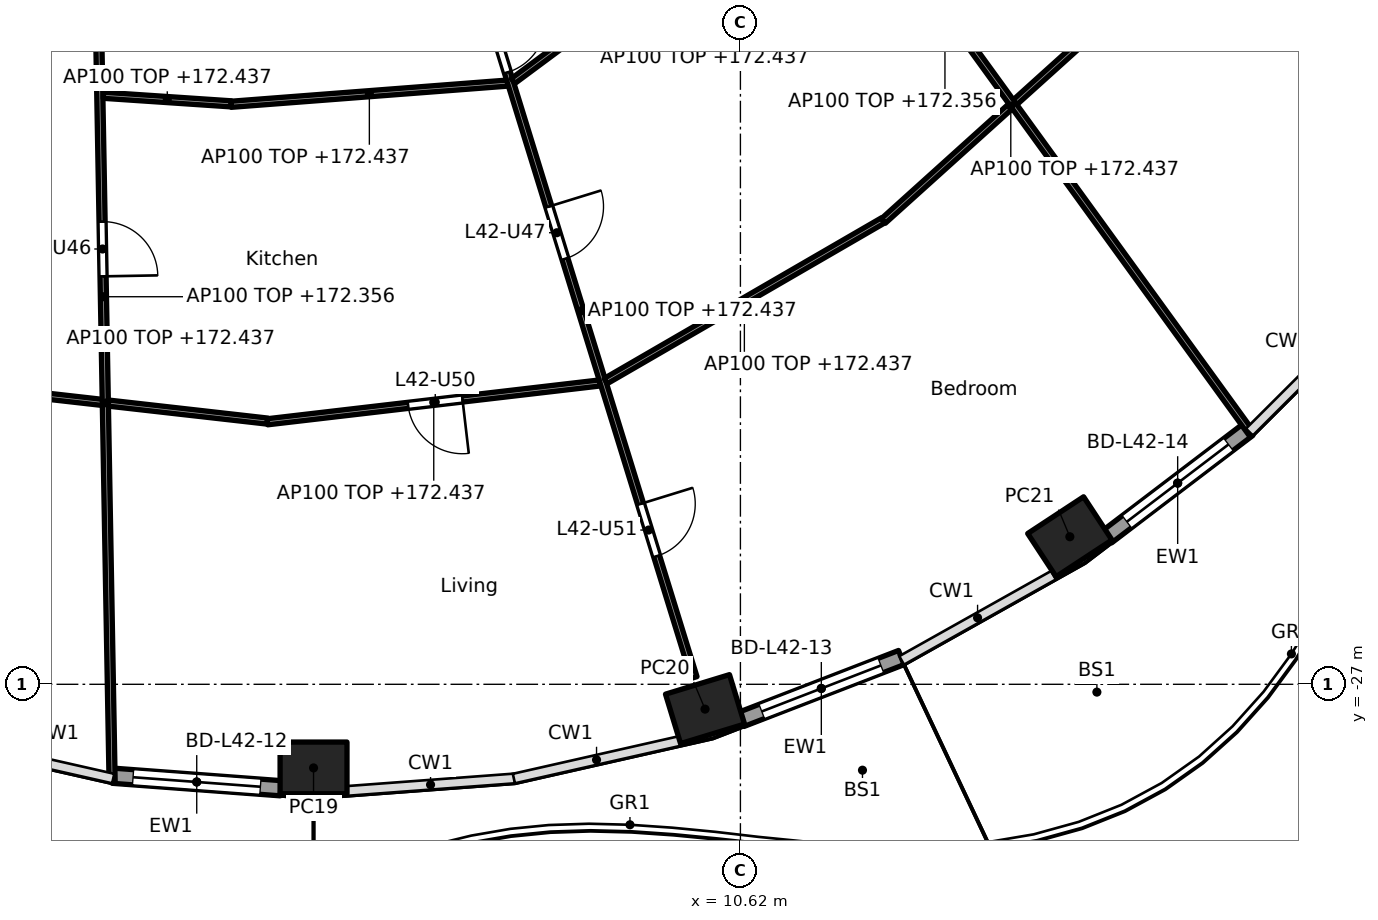
"""IFC4 building model, lengths in metres.
Left out: names, types, materials, properties, quantities, classifications, styles, units other than length and angle.
Written with IfcOpenShell. Run it as: python <this file> out.ifc"""

import sys

from ifc_helpers import new_model, si_unit, direction, frame, frame_2d, origin, origin_2d, place, context, subcontext, project, spatial, rectangle, hollow_rectangle, extrude, element, fill, save


model = new_model("IFC4")
c1 = context("Model", 3, precision=1e-05, world=origin(), true_north=direction((0.0, 1.0)))
c2 = subcontext(c1, "Body", "Model", "MODEL_VIEW")
j1 = project(units=[si_unit("LENGTHUNIT", "METRE"), si_unit("PLANEANGLEUNIT", "RADIAN")], contexts=[c1])
p1 = place(None, origin())
s1 = spatial("IfcSite", under=j1, at=p1, CompositionType="ELEMENT")
p2 = place(p1, origin())
s2 = spatial("IfcBuilding", under=s1, at=p2, CompositionType="ELEMENT")
p3 = place(p2, frame((0.0, 0.0, 169.6)))
s3 = spatial("IfcBuildingStorey", under=s2, at=p3, CompositionType="ELEMENT", Elevation=169.6)
for number, where, z_axis, x_axis in (
    (1, (3.6, -28.375, 0.0), (0.0, 0.0, 1.0), (1.0, 0.0, 0.0)),
    (2, (10.038, -27.408, 0.0), (0.0, 0.0, 1.0), (0.957, 0.292, 0.0)),
    (3, (16.038, -24.573, 0.0), (0.0, 0.0, 1.0), (0.836, 0.549, 0.0)),
):
    element("IfcColumn", number, at=place(p3, frame(where, z_axis=z_axis, x_axis=x_axis)), inside=s3, PredefinedType="COLUMN", context=c2, shape_type="SweptSolid", body=[
        extrude(hollow_rectangle(XDim=1.1, YDim=0.85, WallThickness=0.036, at=origin_2d()), origin(), (0.0, 0.0, 1.0), 3.7),
    ])
p4 = place(p3, frame((3.061, -28.709, 0.0), z_axis=(0.0, 0.0, 1.0), x_axis=(-0.997232064422, 0.074351931305, 0.0)))
e4 = element("IfcWall", 4, at=p4, inside=s3, PredefinedType="SOLIDWALL", context=c2, shape_type="SweptSolid", body=[
    extrude(rectangle(XDim=2.771, YDim=0.25, at=frame_2d((1.386, 0.0))), origin(), (0.0, 0.0, 1.0), 3.44),
])
p5 = place(p4, frame((0.336, 0.0, 0.0)))
e5 = element("IfcOpeningElement", 5, at=p5, cuts=e4, PredefinedType="OPENING", context=c2, shape_type="SweptSolid", body=[
    extrude(rectangle(XDim=2.1, YDim=2.4, at=frame_2d((1.05, 1.2))), frame((0.0, 0.135, 0.0), z_axis=(0.0, -1.0, 0.0), x_axis=(1.0, 0.0, 0.0)), (0.0, 0.0, 1.0), 0.27),
])
p6 = place(p3, frame((13.266, -26.56, 0.0), z_axis=(0.0, 0.0, 1.0), x_axis=(-0.932806734513, -0.360377019311, 0.0)))
e6 = element("IfcWall", 6, at=p6, inside=s3, PredefinedType="SOLIDWALL", context=c2, shape_type="SweptSolid", body=[
    extrude(rectangle(XDim=2.82, YDim=0.25, at=frame_2d((1.41, 0.0))), origin(), (0.0, 0.0, 1.0), 3.44),
])
p7 = place(p6, frame((0.36, 0.0, 0.0)))
e7 = element("IfcOpeningElement", 7, at=p7, cuts=e6, PredefinedType="OPENING", context=c2, shape_type="SweptSolid", body=[
    extrude(rectangle(XDim=2.1, YDim=2.4, at=frame_2d((1.05, 1.2))), frame((0.0, 0.135, 0.0), z_axis=(0.0, -1.0, 0.0), x_axis=(1.0, 0.0, 0.0)), (0.0, 0.0, 1.0), 0.27),
])
p8 = place(p3, frame((18.972, -22.809, 0.0), z_axis=(0.0, 0.0, 1.0), x_axis=(-0.796055733703, -0.60522332146, 0.0)))
e8 = element("IfcWall", 8, at=p8, inside=s3, PredefinedType="SOLIDWALL", context=c2, shape_type="SweptSolid", body=[
    extrude(rectangle(XDim=2.917, YDim=0.25, at=frame_2d((1.458, 0.0))), origin(), (0.0, 0.0, 1.0), 3.44),
])
p9 = place(p8, frame((0.408, 0.0, 0.0)))
e9 = element("IfcOpeningElement", 9, at=p9, cuts=e8, PredefinedType="OPENING", context=c2, shape_type="SweptSolid", body=[
    extrude(rectangle(XDim=2.1, YDim=2.4, at=frame_2d((1.05, 1.2))), frame((0.0, 0.135, 0.0), z_axis=(0.0, -1.0, 0.0), x_axis=(1.0, 0.0, 0.0)), (0.0, 0.0, 1.0), 0.27),
])
p10 = place(p3, frame((-2.449, -22.073, 0.0), z_axis=(0.0, 0.0, 1.0), x_axis=(0.993660315081, -0.112424099879, 0.0)))
e10 = element("IfcWall", 10, at=p10, inside=s3, PredefinedType="PARTITIONING", context=c2, shape_type="SweptSolid", body=[
    extrude(rectangle(XDim=5.325, YDim=0.1, at=frame_2d((2.662, 0.0))), origin(), (0.0, 0.0, 1.0), 2.837),
])
p11 = place(p3, frame((0.002, -12.665, 0.0), z_axis=(0.0, 0.0, 1.0), x_axis=(0.01792079652, -0.999839409631, 0.0)))
e11 = element("IfcWall", 11, at=p11, inside=s3, PredefinedType="PARTITIONING", context=c2, shape_type="SweptSolid", body=[
    extrude(rectangle(XDim=15.926, YDim=0.1, at=frame_2d((7.963, 0.0))), origin(), (0.0, 0.0, 1.0), 2.756),
])
p12 = place(p11, frame((1.873, 0.0, 0.0)))
e12 = element("IfcOpeningElement", 12, at=p12, cuts=e11, PredefinedType="OPENING", context=c2, shape_type="SweptSolid", body=[
    extrude(rectangle(XDim=0.9, YDim=2.1, at=frame_2d((0.45, 1.05))), frame((0.0, 0.06, 0.0), z_axis=(0.0, -1.0, 0.0), x_axis=(1.0, 0.0, 0.0)), (0.0, 0.0, 1.0), 0.12),
])
p13 = place(p11, frame((6.728, 0.0, 0.0)))
e13 = element("IfcOpeningElement", 13, at=p13, cuts=e11, PredefinedType="OPENING", context=c2, shape_type="SweptSolid", body=[
    extrude(rectangle(XDim=0.9, YDim=2.1, at=frame_2d((0.45, 1.05))), frame((0.0, 0.06, 0.0), z_axis=(0.0, -1.0, 0.0), x_axis=(1.0, 0.0, 0.0)), (0.0, 0.0, 1.0), 0.12),
])
p14 = place(p3, frame((0.145, -17.314, 0.0), z_axis=(0.0, 0.0, 1.0), x_axis=(0.997756833447, -0.06694252243, 0.0)))
e14 = element("IfcWall", 14, at=p14, inside=s3, PredefinedType="PARTITIONING", context=c2, shape_type="SweptSolid", body=[
    extrude(rectangle(XDim=2.104, YDim=0.1, at=frame_2d((1.052, 0.0))), origin(), (0.0, 0.0, 1.0), 2.837),
])
p15 = place(p3, frame((2.245, -17.462, 0.0), z_axis=(0.0, 0.0, 1.0), x_axis=(0.997077117727, 0.07640171009, 0.0)))
e15 = element("IfcWall", 15, at=p15, inside=s3, PredefinedType="PARTITIONING", context=c2, shape_type="SweptSolid", body=[
    extrude(rectangle(XDim=4.56, YDim=0.1, at=frame_2d((2.28, 0.0))), origin(), (0.0, 0.0, 1.0), 2.837),
])
p16 = place(p3, frame((2.842, -22.683, 0.0), z_axis=(0.0, 0.0, 1.0), x_axis=(0.993248590259, 0.116005335864, 0.0)))
e16 = element("IfcWall", 16, at=p16, inside=s3, PredefinedType="PARTITIONING", context=c2, shape_type="SweptSolid", body=[
    extrude(rectangle(XDim=5.508, YDim=0.1, at=frame_2d((2.754, 0.0))), origin(), (0.0, 0.0, 1.0), 2.837),
])
p17 = place(p16, frame((2.329, 0.0, 0.0)))
e17 = element("IfcOpeningElement", 17, at=p17, cuts=e16, PredefinedType="OPENING", context=c2, shape_type="SweptSolid", body=[
    extrude(rectangle(XDim=0.9, YDim=2.1, at=frame_2d((0.45, 1.05))), frame((0.0, 0.06, 0.0), z_axis=(0.0, -1.0, 0.0), x_axis=(1.0, 0.0, 0.0)), (0.0, 0.0, 1.0), 0.12),
])
p18 = place(p3, frame((6.138, -14.83, 0.0), z_axis=(0.0, 0.0, 1.0), x_axis=(0.294818517221, -0.955553264818, 0.0)))
e18 = element("IfcWall", 18, at=p18, inside=s3, PredefinedType="PARTITIONING", context=c2, shape_type="SweptSolid", body=[
    extrude(rectangle(XDim=12.619, YDim=0.1, at=frame_2d((6.31, 0.0))), origin(), (0.0, 0.0, 1.0), 2.837),
])
p19 = place(p18, frame((1.306, 0.0, 0.0)))
e19 = element("IfcOpeningElement", 19, at=p19, cuts=e18, PredefinedType="OPENING", context=c2, shape_type="SweptSolid", body=[
    extrude(rectangle(XDim=0.9, YDim=2.1, at=frame_2d((0.45, 1.05))), frame((0.0, 0.06, 0.0), z_axis=(0.0, -1.0, 0.0), x_axis=(1.0, 0.0, 0.0)), (0.0, 0.0, 1.0), 0.12),
])
p20 = place(p18, frame((4.515, 0.0, 0.0)))
e20 = element("IfcOpeningElement", 20, at=p20, cuts=e18, PredefinedType="OPENING", context=c2, shape_type="SweptSolid", body=[
    extrude(rectangle(XDim=0.9, YDim=2.1, at=frame_2d((0.45, 1.05))), frame((0.0, 0.06, 0.0), z_axis=(0.0, -1.0, 0.0), x_axis=(1.0, 0.0, 0.0)), (0.0, 0.0, 1.0), 0.12),
])
p21 = place(p18, frame((9.632, 0.0, 0.0)))
e21 = element("IfcOpeningElement", 21, at=p21, cuts=e18, PredefinedType="OPENING", context=c2, shape_type="SweptSolid", body=[
    extrude(rectangle(XDim=0.9, YDim=2.1, at=frame_2d((0.45, 1.05))), frame((0.0, 0.06, 0.0), z_axis=(0.0, -1.0, 0.0), x_axis=(1.0, 0.0, 0.0)), (0.0, 0.0, 1.0), 0.12),
])
p22 = place(p3, frame((6.881, -17.08, 0.0), z_axis=(0.0, 0.0, 1.0), x_axis=(0.802784956441, 0.596268659005, 0.0)))
e22 = element("IfcWall", 22, at=p22, inside=s3, PredefinedType="PARTITIONING", context=c2, shape_type="SweptSolid", body=[
    extrude(rectangle(XDim=4.142, YDim=0.1, at=frame_2d((2.071, 0.0))), origin(), (0.0, 0.0, 1.0), 2.837),
])
p23 = place(p3, frame((8.405, -22.013, 0.0), z_axis=(0.0, 0.0, 1.0), x_axis=(0.865277177388, 0.501293732547, 0.0)))
e23 = element("IfcWall", 23, at=p23, inside=s3, PredefinedType="PARTITIONING", context=c2, shape_type="SweptSolid", body=[
    extrude(rectangle(XDim=5.27, YDim=0.1, at=frame_2d((2.635, 0.0))), origin(), (0.0, 0.0, 1.0), 2.837),
])
p24 = place(p3, frame((12.971, -19.38, 0.0), z_axis=(0.0, 0.0, 1.0), x_axis=(0.742768881471, 0.669547898748, 0.0)))
e24 = element("IfcWall", 24, at=p24, inside=s3, PredefinedType="PARTITIONING", context=c2, shape_type="SweptSolid", body=[
    extrude(rectangle(XDim=5.642, YDim=0.1, at=frame_2d((2.821, 0.0))), origin(), (0.0, 0.0, 1.0), 2.837),
])
p25 = place(p3, frame((8.943, -8.966, 0.0), z_axis=(0.0, 0.0, 1.0), x_axis=(0.586803608919, -0.809729290912, 0.0)))
e25 = element("IfcWall", 25, at=p25, inside=s3, PredefinedType="PARTITIONING", context=c2, shape_type="SweptSolid", body=[
    extrude(rectangle(XDim=17.179, YDim=0.1, at=frame_2d((8.589, 0.0))), origin(), (0.0, 0.0, 1.0), 2.756),
])
p26 = place(p25, frame((2.062, 0.0, 0.0)))
e26 = element("IfcOpeningElement", 26, at=p26, cuts=e25, PredefinedType="OPENING", context=c2, shape_type="SweptSolid", body=[
    extrude(rectangle(XDim=0.9, YDim=2.1, at=frame_2d((0.45, 1.05))), frame((0.0, 0.06, 0.0), z_axis=(0.0, -1.0, 0.0), x_axis=(1.0, 0.0, 0.0)), (0.0, 0.0, 1.0), 0.12),
])
p27 = place(p25, frame((7.308, 0.0, 0.0)))
e27 = element("IfcOpeningElement", 27, at=p27, cuts=e25, PredefinedType="OPENING", context=c2, shape_type="SweptSolid", body=[
    extrude(rectangle(XDim=0.9, YDim=2.1, at=frame_2d((0.45, 1.05))), frame((0.0, 0.06, 0.0), z_axis=(0.0, -1.0, 0.0), x_axis=(1.0, 0.0, 0.0)), (0.0, 0.0, 1.0), 0.12),
])
p28 = place(p5, origin())
e28 = element("IfcDoor", 28, at=p28, inside=s3, OperationType="SLIDING_TO_LEFT", PredefinedType="DOOR", context=c2, shape_type="SweptSolid", body=[
    extrude(rectangle(XDim=2.1, YDim=2.4, at=frame_2d((1.05, 1.2))), frame((0.0, 0.025, 0.0), z_axis=(0.0, -1.0, 0.0), x_axis=(1.0, 0.0, 0.0)), (0.0, 0.0, 1.0), 0.05),
])
fill(e5, e28)
p29 = place(p7, origin())
e29 = element("IfcDoor", 29, at=p29, inside=s3, OperationType="SLIDING_TO_LEFT", PredefinedType="DOOR", context=c2, shape_type="SweptSolid", body=[
    extrude(rectangle(XDim=2.1, YDim=2.4, at=frame_2d((1.05, 1.2))), frame((0.0, 0.025, 0.0), z_axis=(0.0, -1.0, 0.0), x_axis=(1.0, 0.0, 0.0)), (0.0, 0.0, 1.0), 0.05),
])
fill(e7, e29)
p30 = place(p9, origin())
e30 = element("IfcDoor", 30, at=p30, inside=s3, OperationType="SLIDING_TO_LEFT", PredefinedType="DOOR", context=c2, shape_type="SweptSolid", body=[
    extrude(rectangle(XDim=2.1, YDim=2.4, at=frame_2d((1.05, 1.2))), frame((0.0, 0.025, 0.0), z_axis=(0.0, -1.0, 0.0), x_axis=(1.0, 0.0, 0.0)), (0.0, 0.0, 1.0), 0.05),
])
fill(e9, e30)
p31 = place(p19, origin())
e31 = element("IfcDoor", 31, at=p31, inside=s3, OperationType="SINGLE_SWING_LEFT", PredefinedType="DOOR", context=c2, shape_type="SweptSolid", body=[
    extrude(rectangle(XDim=0.9, YDim=2.1, at=frame_2d((0.45, 1.05))), frame((0.0, 0.025, 0.0), z_axis=(0.0, -1.0, 0.0), x_axis=(1.0, 0.0, 0.0)), (0.0, 0.0, 1.0), 0.05),
])
fill(e19, e31)
p32 = place(p13, origin())
e32 = element("IfcDoor", 32, at=p32, inside=s3, OperationType="SINGLE_SWING_RIGHT", PredefinedType="DOOR", context=c2, shape_type="SweptSolid", body=[
    extrude(rectangle(XDim=0.9, YDim=2.1, at=frame_2d((0.45, 1.05))), frame((0.0, 0.025, 0.0), z_axis=(0.0, -1.0, 0.0), x_axis=(1.0, 0.0, 0.0)), (0.0, 0.0, 1.0), 0.05),
])
fill(e13, e32)
p33 = place(p20, origin())
e33 = element("IfcDoor", 33, at=p33, inside=s3, OperationType="SINGLE_SWING_LEFT", PredefinedType="DOOR", context=c2, shape_type="SweptSolid", body=[
    extrude(rectangle(XDim=0.9, YDim=2.1, at=frame_2d((0.45, 1.05))), frame((0.0, 0.025, 0.0), z_axis=(0.0, -1.0, 0.0), x_axis=(1.0, 0.0, 0.0)), (0.0, 0.0, 1.0), 0.05),
])
fill(e20, e33)
p34 = place(p17, frame((0.9, 0.0, 0.0), x_axis=(-1.0, 0.0, 0.0)))
e34 = element("IfcDoor", 34, at=p34, inside=s3, OperationType="SINGLE_SWING_LEFT", PredefinedType="DOOR", context=c2, shape_type="SweptSolid", body=[
    extrude(rectangle(XDim=0.9, YDim=2.1, at=frame_2d((0.45, 1.05))), frame((0.0, 0.025, 0.0), z_axis=(0.0, -1.0, 0.0), x_axis=(1.0, 0.0, 0.0)), (0.0, 0.0, 1.0), 0.05),
])
fill(e17, e34)
p35 = place(p21, origin())
e35 = element("IfcDoor", 35, at=p35, inside=s3, OperationType="SINGLE_SWING_LEFT", PredefinedType="DOOR", context=c2, shape_type="SweptSolid", body=[
    extrude(rectangle(XDim=0.9, YDim=2.1, at=frame_2d((0.45, 1.05))), frame((0.0, 0.025, 0.0), z_axis=(0.0, -1.0, 0.0), x_axis=(1.0, 0.0, 0.0)), (0.0, 0.0, 1.0), 0.05),
])
fill(e21, e35)
save(model, sys.argv[1])
